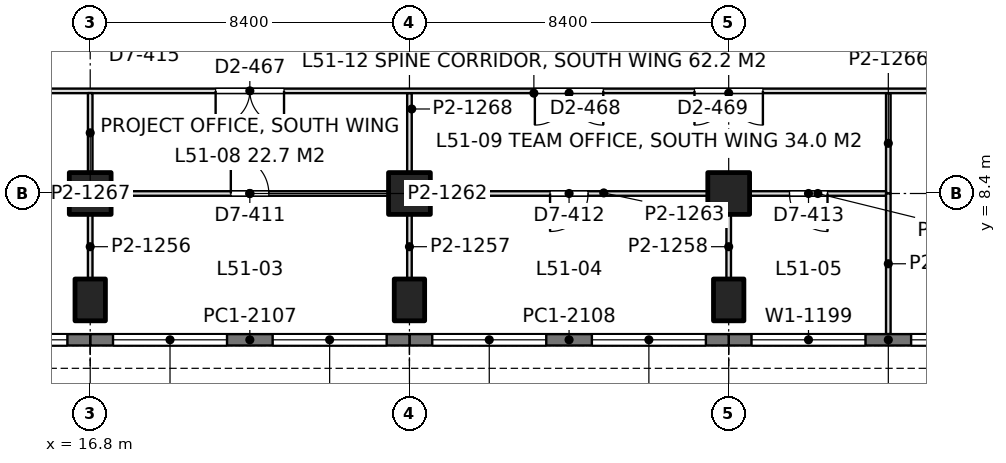
"""IFC4 building model, lengths in metres.
Left out: names, types, materials, properties, quantities, classifications, styles, units other than length and angle.
Written with IfcOpenShell. Run it as: python <this file> out.ifc"""

import sys

from ifc_helpers import new_model, si_unit, direction, frame, frame_2d, origin, origin_2d, place, context, subcontext, project, spatial, rectangle, extrude, element, fill, save


model = new_model("IFC4")
c1 = context("Model", 3, precision=1e-05, world=origin(), true_north=direction((0.0, 1.0)))
c2 = subcontext(c1, "Body", "Model", "MODEL_VIEW")
j1 = project(units=[si_unit("LENGTHUNIT", "METRE"), si_unit("PLANEANGLEUNIT", "RADIAN")], contexts=[c1])
p1 = place(None, origin())
s1 = spatial("IfcSite", under=j1, at=p1, CompositionType="ELEMENT")
p2 = place(p1, origin())
s2 = spatial("IfcBuilding", under=s1, at=p2, CompositionType="ELEMENT")
p3 = place(p2, frame((0.0, 0.0, 223.8)))
s3 = spatial("IfcBuildingStorey", under=s2, at=p3, CompositionType="ELEMENT", Elevation=223.8)
p4 = place(p3, frame((16.8, 5.6, 0.0), z_axis=(0.0, 0.0, 1.0), x_axis=(1.0, 0.0, 0.0)))
e1 = element("IfcColumn", 1, at=p4, inside=s3, PredefinedType="COLUMN", context=c2, shape_type="SweptSolid", body=[
    extrude(rectangle(XDim=0.8, YDim=1.1, at=origin_2d()), origin(), (0.0, 0.0, 1.0), 4.2),
])
p5 = place(p3, frame((16.8, 8.4, 0.0), z_axis=(0.0, 0.0, 1.0), x_axis=(1.0, 0.0, 0.0)))
e2 = element("IfcColumn", 2, at=p5, inside=s3, PredefinedType="COLUMN", context=c2, shape_type="SweptSolid", body=[
    extrude(rectangle(XDim=1.1, YDim=1.1, at=origin_2d()), origin(), (0.0, 0.0, 1.0), 4.2),
])
p6 = place(p3, frame((25.2, 5.6, 0.0), z_axis=(0.0, 0.0, 1.0), x_axis=(1.0, 0.0, 0.0)))
e3 = element("IfcColumn", 3, at=p6, inside=s3, PredefinedType="COLUMN", context=c2, shape_type="SweptSolid", body=[
    extrude(rectangle(XDim=0.8, YDim=1.1, at=origin_2d()), origin(), (0.0, 0.0, 1.0), 4.2),
])
p7 = place(p3, frame((25.2, 8.4, 0.0), z_axis=(0.0, 0.0, 1.0), x_axis=(1.0, 0.0, 0.0)))
e4 = element("IfcColumn", 4, at=p7, inside=s3, PredefinedType="COLUMN", context=c2, shape_type="SweptSolid", body=[
    extrude(rectangle(XDim=1.1, YDim=1.1, at=origin_2d()), origin(), (0.0, 0.0, 1.0), 4.2),
])
p8 = place(p3, frame((33.6, 5.6, 0.0), z_axis=(0.0, 0.0, 1.0), x_axis=(1.0, 0.0, 0.0)))
e5 = element("IfcColumn", 5, at=p8, inside=s3, PredefinedType="COLUMN", context=c2, shape_type="SweptSolid", body=[
    extrude(rectangle(XDim=0.8, YDim=1.1, at=origin_2d()), origin(), (0.0, 0.0, 1.0), 4.2),
])
p9 = place(p3, frame((33.6, 8.4, 0.0), z_axis=(0.0, 0.0, 1.0), x_axis=(1.0, 0.0, 0.0)))
e6 = element("IfcColumn", 6, at=p9, inside=s3, PredefinedType="COLUMN", context=c2, shape_type="SweptSolid", body=[
    extrude(rectangle(XDim=1.1, YDim=1.1, at=origin_2d()), origin(), (0.0, 0.0, 1.0), 4.2),
])
p10 = place(p3, frame((42.0, 4.55, 0.0), z_axis=(0.0, 0.0, 1.0), x_axis=(-1.0, 0.0, 0.0)))
e7 = element("IfcWall", 7, at=p10, inside=s3, PredefinedType="SOLIDWALL", context=c2, shape_type="SweptSolid", body=[
    extrude(rectangle(XDim=8.4, YDim=0.3, at=frame_2d((4.2, 0.0))), origin(), (0.0, 0.0, 1.0), 4.05),
])
p11 = place(p10, frame((0.6, 0.0, 0.9)))
e8 = element("IfcOpeningElement", 8, at=p11, cuts=e7, PredefinedType="OPENING", context=c2, shape_type="SweptSolid", body=[
    extrude(rectangle(XDim=3.0, YDim=1.9, at=frame_2d((1.5, 0.95))), frame((0.0, 0.16, 0.0), z_axis=(0.0, -1.0, 0.0), x_axis=(1.0, 0.0, 0.0)), (0.0, 0.0, 1.0), 0.32),
])
p12 = place(p10, frame((4.8, 0.0, 0.9)))
e9 = element("IfcOpeningElement", 9, at=p12, cuts=e7, PredefinedType="OPENING", context=c2, shape_type="SweptSolid", body=[
    extrude(rectangle(XDim=3.0, YDim=1.9, at=frame_2d((1.5, 0.95))), frame((0.0, 0.16, 0.0), z_axis=(0.0, -1.0, 0.0), x_axis=(1.0, 0.0, 0.0)), (0.0, 0.0, 1.0), 0.32),
])
p13 = place(p3, frame((33.6, 4.55, 0.0), z_axis=(0.0, 0.0, 1.0), x_axis=(-1.0, 0.0, 0.0)))
e10 = element("IfcWall", 10, at=p13, inside=s3, PredefinedType="SOLIDWALL", context=c2, shape_type="SweptSolid", body=[
    extrude(rectangle(XDim=8.4, YDim=0.3, at=frame_2d((4.2, 0.0))), origin(), (0.0, 0.0, 1.0), 4.05),
])
p14 = place(p13, frame((0.6, 0.0, 0.9)))
e11 = element("IfcOpeningElement", 11, at=p14, cuts=e10, PredefinedType="OPENING", context=c2, shape_type="SweptSolid", body=[
    extrude(rectangle(XDim=3.0, YDim=1.9, at=frame_2d((1.5, 0.95))), frame((0.0, 0.16, 0.0), z_axis=(0.0, -1.0, 0.0), x_axis=(1.0, 0.0, 0.0)), (0.0, 0.0, 1.0), 0.32),
])
p15 = place(p13, frame((4.8, 0.0, 0.9)))
e12 = element("IfcOpeningElement", 12, at=p15, cuts=e10, PredefinedType="OPENING", context=c2, shape_type="SweptSolid", body=[
    extrude(rectangle(XDim=3.0, YDim=1.9, at=frame_2d((1.5, 0.95))), frame((0.0, 0.16, 0.0), z_axis=(0.0, -1.0, 0.0), x_axis=(1.0, 0.0, 0.0)), (0.0, 0.0, 1.0), 0.32),
])
p16 = place(p3, frame((25.2, 4.55, 0.0), z_axis=(0.0, 0.0, 1.0), x_axis=(-1.0, 0.0, 0.0)))
e13 = element("IfcWall", 13, at=p16, inside=s3, PredefinedType="SOLIDWALL", context=c2, shape_type="SweptSolid", body=[
    extrude(rectangle(XDim=8.4, YDim=0.3, at=frame_2d((4.2, 0.0))), origin(), (0.0, 0.0, 1.0), 4.05),
])
p17 = place(p16, frame((0.6, 0.0, 0.9)))
e14 = element("IfcOpeningElement", 14, at=p17, cuts=e13, PredefinedType="OPENING", context=c2, shape_type="SweptSolid", body=[
    extrude(rectangle(XDim=3.0, YDim=1.9, at=frame_2d((1.5, 0.95))), frame((0.0, 0.16, 0.0), z_axis=(0.0, -1.0, 0.0), x_axis=(1.0, 0.0, 0.0)), (0.0, 0.0, 1.0), 0.32),
])
p18 = place(p16, frame((4.8, 0.0, 0.9)))
e15 = element("IfcOpeningElement", 15, at=p18, cuts=e13, PredefinedType="OPENING", context=c2, shape_type="SweptSolid", body=[
    extrude(rectangle(XDim=3.0, YDim=1.9, at=frame_2d((1.5, 0.95))), frame((0.0, 0.16, 0.0), z_axis=(0.0, -1.0, 0.0), x_axis=(1.0, 0.0, 0.0)), (0.0, 0.0, 1.0), 0.32),
])
p19 = place(p3, frame((16.8, 4.55, 0.0), z_axis=(0.0, 0.0, 1.0), x_axis=(-1.0, 0.0, 0.0)))
e16 = element("IfcWall", 16, at=p19, inside=s3, PredefinedType="SOLIDWALL", context=c2, shape_type="SweptSolid", body=[
    extrude(rectangle(XDim=8.4, YDim=0.3, at=frame_2d((4.2, 0.0))), origin(), (0.0, 0.0, 1.0), 4.05),
])
p20 = place(p19, frame((0.6, 0.0, 0.9)))
e17 = element("IfcOpeningElement", 17, at=p20, cuts=e16, PredefinedType="OPENING", context=c2, shape_type="SweptSolid", body=[
    extrude(rectangle(XDim=3.0, YDim=1.9, at=frame_2d((1.5, 0.95))), frame((0.0, 0.16, 0.0), z_axis=(0.0, -1.0, 0.0), x_axis=(1.0, 0.0, 0.0)), (0.0, 0.0, 1.0), 0.32),
])
p21 = place(p19, frame((4.8, 0.0, 0.9)))
e18 = element("IfcOpeningElement", 18, at=p21, cuts=e16, PredefinedType="OPENING", context=c2, shape_type="SweptSolid", body=[
    extrude(rectangle(XDim=3.0, YDim=1.9, at=frame_2d((1.5, 0.95))), frame((0.0, 0.16, 0.0), z_axis=(0.0, -1.0, 0.0), x_axis=(1.0, 0.0, 0.0)), (0.0, 0.0, 1.0), 0.32),
])
p22 = place(p3, frame((8.949, 8.4, 0.0), z_axis=(0.0, 0.0, 1.0), x_axis=(1.0, 0.0, 0.0)))
e19 = element("IfcWall", 19, at=p22, inside=s3, PredefinedType="PARTITIONING", context=c2, shape_type="SweptSolid", body=[
    extrude(rectangle(XDim=7.302, YDim=0.12, at=frame_2d((3.651, 0.0))), origin(), (0.0, 0.0, 1.0), 3.55),
])
p23 = place(p22, frame((3.151, 0.0, 0.0)))
e20 = element("IfcOpeningElement", 20, at=p23, cuts=e19, PredefinedType="OPENING", context=c2, shape_type="SweptSolid", body=[
    extrude(rectangle(XDim=1.0, YDim=2.4, at=frame_2d((0.5, 1.2))), frame((0.0, 0.07, 0.0), z_axis=(0.0, -1.0, 0.0), x_axis=(1.0, 0.0, 0.0)), (0.0, 0.0, 1.0), 0.14),
])
p24 = place(p3, frame((17.349, 8.4, 0.0), z_axis=(0.0, 0.0, 1.0), x_axis=(1.0, 0.0, 0.0)))
e21 = element("IfcWall", 21, at=p24, inside=s3, PredefinedType="PARTITIONING", context=c2, shape_type="SweptSolid", body=[
    extrude(rectangle(XDim=7.302, YDim=0.12, at=frame_2d((3.651, 0.0))), origin(), (0.0, 0.0, 1.0), 3.55),
])
p25 = place(p24, frame((3.151, 0.0, 0.0)))
e22 = element("IfcOpeningElement", 22, at=p25, cuts=e21, PredefinedType="OPENING", context=c2, shape_type="SweptSolid", body=[
    extrude(rectangle(XDim=1.0, YDim=2.4, at=frame_2d((0.5, 1.2))), frame((0.0, 0.07, 0.0), z_axis=(0.0, -1.0, 0.0), x_axis=(1.0, 0.0, 0.0)), (0.0, 0.0, 1.0), 0.14),
])
p26 = place(p3, frame((25.749, 8.4, 0.0), z_axis=(0.0, 0.0, 1.0), x_axis=(1.0, 0.0, 0.0)))
e23 = element("IfcWall", 23, at=p26, inside=s3, PredefinedType="PARTITIONING", context=c2, shape_type="SweptSolid", body=[
    extrude(rectangle(XDim=7.302, YDim=0.12, at=frame_2d((3.651, 0.0))), origin(), (0.0, 0.0, 1.0), 3.55),
])
p27 = place(p26, frame((3.151, 0.0, 0.0)))
e24 = element("IfcOpeningElement", 24, at=p27, cuts=e23, PredefinedType="OPENING", context=c2, shape_type="SweptSolid", body=[
    extrude(rectangle(XDim=1.0, YDim=2.4, at=frame_2d((0.5, 1.2))), frame((0.0, 0.07, 0.0), z_axis=(0.0, -1.0, 0.0), x_axis=(1.0, 0.0, 0.0)), (0.0, 0.0, 1.0), 0.14),
])
p28 = place(p3, frame((34.149, 8.4, 0.0), z_axis=(0.0, 0.0, 1.0), x_axis=(1.0, 0.0, 0.0)))
e25 = element("IfcWall", 25, at=p28, inside=s3, PredefinedType="PARTITIONING", context=c2, shape_type="SweptSolid", body=[
    extrude(rectangle(XDim=3.593, YDim=0.12, at=frame_2d((1.796, 0.0))), origin(), (0.0, 0.0, 1.0), 3.55),
])
p29 = place(p28, frame((1.051, 0.0, 0.0)))
e26 = element("IfcOpeningElement", 26, at=p29, cuts=e25, PredefinedType="OPENING", context=c2, shape_type="SweptSolid", body=[
    extrude(rectangle(XDim=1.0, YDim=2.4, at=frame_2d((0.5, 1.2))), frame((0.0, 0.07, 0.0), z_axis=(0.0, -1.0, 0.0), x_axis=(1.0, 0.0, 0.0)), (0.0, 0.0, 1.0), 0.14),
])
for number, where, z_axis, x_axis in (
    (27, (16.8, 6.149, 0.0), (0.0, 0.0, 1.0), (0.0, 1.0, 0.0)),
    (28, (25.2, 6.149, 0.0), (0.0, 0.0, 1.0), (0.0, 1.0, 0.0)),
    (29, (33.6, 6.149, 0.0), (0.0, 0.0, 1.0), (0.0, 1.0, 0.0)),
):
    element("IfcWall", number, at=place(p3, frame(where, z_axis=z_axis, x_axis=x_axis)), inside=s3, PredefinedType="PARTITIONING", context=c2, shape_type="SweptSolid", body=[
        extrude(rectangle(XDim=1.702, YDim=0.12, at=frame_2d((0.851, 0.0))), origin(), (0.0, 0.0, 1.0), 3.69),
    ])
p30 = place(p3, frame((37.8, 4.7, 0.0), z_axis=(0.0, 0.0, 1.0), x_axis=(0.0, 1.0, 0.0)))
e30 = element("IfcWall", 30, at=p30, inside=s3, PredefinedType="PARTITIONING", context=c2, shape_type="SweptSolid", body=[
    extrude(rectangle(XDim=3.702, YDim=0.12, at=frame_2d((1.851, 0.0))), origin(), (0.0, 0.0, 1.0), 3.55),
])
p31 = place(p3, frame((16.8, 8.949, 0.0), z_axis=(0.0, 0.0, 1.0), x_axis=(0.0, 1.0, 0.0)))
e31 = element("IfcWall", 31, at=p31, inside=s3, PredefinedType="PARTITIONING", context=c2, shape_type="SweptSolid", body=[
    extrude(rectangle(XDim=2.093, YDim=0.12, at=frame_2d((1.046, 0.0))), origin(), (0.0, 0.0, 1.0), 3.69),
])
p32 = place(p3, frame((25.2, 8.949, 0.0), z_axis=(0.0, 0.0, 1.0), x_axis=(0.0, 1.0, 0.0)))
e32 = element("IfcWall", 32, at=p32, inside=s3, PredefinedType="PARTITIONING", context=c2, shape_type="SweptSolid", body=[
    extrude(rectangle(XDim=2.093, YDim=0.12, at=frame_2d((1.046, 0.0))), origin(), (0.0, 0.0, 1.0), 3.55),
])
p33 = place(p3, frame((37.8, 8.398, 0.0), z_axis=(0.0, 0.0, 1.0), x_axis=(0.0, 1.0, 0.0)))
e33 = element("IfcWall", 33, at=p33, inside=s3, PredefinedType="PARTITIONING", context=c2, shape_type="SweptSolid", body=[
    extrude(rectangle(XDim=2.644, YDim=0.12, at=frame_2d((1.322, 0.0))), origin(), (0.0, 0.0, 1.0), 3.55),
])
p34 = place(p3, frame((7.748, 11.1, 0.0), z_axis=(0.0, 0.0, 1.0), x_axis=(1.0, 0.0, 0.0)))
e34 = element("IfcWall", 34, at=p34, inside=s3, PredefinedType="PARTITIONING", context=c2, shape_type="SweptSolid", body=[
    extrude(rectangle(XDim=41.452, YDim=0.12, at=frame_2d((20.726, 0.0))), origin(), (0.0, 0.0, 1.0), 3.55),
])
p35 = place(p34, frame((2.119, 0.0, 0.0)))
e35 = element("IfcOpeningElement", 35, at=p35, cuts=e34, PredefinedType="OPENING", context=c2, shape_type="SweptSolid", body=[
    extrude(rectangle(XDim=1.8, YDim=2.2, at=frame_2d((0.9, 1.1))), frame((0.0, 0.07, 0.0), z_axis=(0.0, -1.0, 0.0), x_axis=(1.0, 0.0, 0.0)), (0.0, 0.0, 1.0), 0.14),
])
p36 = place(p34, frame((5.135, 0.0, 0.0)))
e36 = element("IfcOpeningElement", 36, at=p36, cuts=e34, PredefinedType="OPENING", context=c2, shape_type="SweptSolid", body=[
    extrude(rectangle(XDim=1.8, YDim=2.2, at=frame_2d((0.9, 1.1))), frame((0.0, 0.07, 0.0), z_axis=(0.0, -1.0, 0.0), x_axis=(1.0, 0.0, 0.0)), (0.0, 0.0, 1.0), 0.14),
])
p37 = place(p34, frame((12.352, 0.0, 0.0)))
e37 = element("IfcOpeningElement", 37, at=p37, cuts=e34, PredefinedType="OPENING", context=c2, shape_type="SweptSolid", body=[
    extrude(rectangle(XDim=1.8, YDim=2.2, at=frame_2d((0.9, 1.1))), frame((0.0, 0.07, 0.0), z_axis=(0.0, -1.0, 0.0), x_axis=(1.0, 0.0, 0.0)), (0.0, 0.0, 1.0), 0.14),
])
p38 = place(p34, frame((20.752, 0.0, 0.0)))
e38 = element("IfcOpeningElement", 38, at=p38, cuts=e34, PredefinedType="OPENING", context=c2, shape_type="SweptSolid", body=[
    extrude(rectangle(XDim=1.8, YDim=2.2, at=frame_2d((0.9, 1.1))), frame((0.0, 0.07, 0.0), z_axis=(0.0, -1.0, 0.0), x_axis=(1.0, 0.0, 0.0)), (0.0, 0.0, 1.0), 0.14),
])
p39 = place(p34, frame((24.952, 0.0, 0.0)))
e39 = element("IfcOpeningElement", 39, at=p39, cuts=e34, PredefinedType="OPENING", context=c2, shape_type="SweptSolid", body=[
    extrude(rectangle(XDim=1.8, YDim=2.2, at=frame_2d((0.9, 1.1))), frame((0.0, 0.07, 0.0), z_axis=(0.0, -1.0, 0.0), x_axis=(1.0, 0.0, 0.0)), (0.0, 0.0, 1.0), 0.14),
])
p40 = place(p34, frame((32.952, 0.0, 0.0)))
e40 = element("IfcOpeningElement", 40, at=p40, cuts=e34, PredefinedType="OPENING", context=c2, shape_type="SweptSolid", body=[
    extrude(rectangle(XDim=1.8, YDim=2.2, at=frame_2d((0.9, 1.1))), frame((0.0, 0.07, 0.0), z_axis=(0.0, -1.0, 0.0), x_axis=(1.0, 0.0, 0.0)), (0.0, 0.0, 1.0), 0.14),
])
p41 = place(p34, frame((36.752, 0.0, 0.0)))
e41 = element("IfcOpeningElement", 41, at=p41, cuts=e34, PredefinedType="OPENING", context=c2, shape_type="SweptSolid", body=[
    extrude(rectangle(XDim=1.8, YDim=2.2, at=frame_2d((0.9, 1.1))), frame((0.0, 0.07, 0.0), z_axis=(0.0, -1.0, 0.0), x_axis=(1.0, 0.0, 0.0)), (0.0, 0.0, 1.0), 0.14),
])
p42 = place(p11, origin())
e42 = element("IfcWindow", 42, at=p42, inside=s3, PartitioningType="SINGLE_PANEL", PredefinedType="WINDOW", context=c2, shape_type="SweptSolid", body=[
    extrude(rectangle(XDim=3.0, YDim=1.9, at=frame_2d((1.5, 0.95))), frame((0.0, 0.03, 0.0), z_axis=(0.0, -1.0, 0.0), x_axis=(1.0, 0.0, 0.0)), (0.0, 0.0, 1.0), 0.06),
])
fill(e8, e42)
p43 = place(p12, origin())
e43 = element("IfcWindow", 43, at=p43, inside=s3, PartitioningType="SINGLE_PANEL", PredefinedType="WINDOW", context=c2, shape_type="SweptSolid", body=[
    extrude(rectangle(XDim=3.0, YDim=1.9, at=frame_2d((1.5, 0.95))), frame((0.0, 0.03, 0.0), z_axis=(0.0, -1.0, 0.0), x_axis=(1.0, 0.0, 0.0)), (0.0, 0.0, 1.0), 0.06),
])
fill(e9, e43)
p44 = place(p14, origin())
e44 = element("IfcWindow", 44, at=p44, inside=s3, PartitioningType="SINGLE_PANEL", PredefinedType="WINDOW", context=c2, shape_type="SweptSolid", body=[
    extrude(rectangle(XDim=3.0, YDim=1.9, at=frame_2d((1.5, 0.95))), frame((0.0, 0.03, 0.0), z_axis=(0.0, -1.0, 0.0), x_axis=(1.0, 0.0, 0.0)), (0.0, 0.0, 1.0), 0.06),
])
fill(e11, e44)
p45 = place(p15, origin())
e45 = element("IfcWindow", 45, at=p45, inside=s3, PartitioningType="SINGLE_PANEL", PredefinedType="WINDOW", context=c2, shape_type="SweptSolid", body=[
    extrude(rectangle(XDim=3.0, YDim=1.9, at=frame_2d((1.5, 0.95))), frame((0.0, 0.03, 0.0), z_axis=(0.0, -1.0, 0.0), x_axis=(1.0, 0.0, 0.0)), (0.0, 0.0, 1.0), 0.06),
])
fill(e12, e45)
p46 = place(p17, origin())
e46 = element("IfcWindow", 46, at=p46, inside=s3, PartitioningType="SINGLE_PANEL", PredefinedType="WINDOW", context=c2, shape_type="SweptSolid", body=[
    extrude(rectangle(XDim=3.0, YDim=1.9, at=frame_2d((1.5, 0.95))), frame((0.0, 0.03, 0.0), z_axis=(0.0, -1.0, 0.0), x_axis=(1.0, 0.0, 0.0)), (0.0, 0.0, 1.0), 0.06),
])
fill(e14, e46)
p47 = place(p18, origin())
e47 = element("IfcWindow", 47, at=p47, inside=s3, PartitioningType="SINGLE_PANEL", PredefinedType="WINDOW", context=c2, shape_type="SweptSolid", body=[
    extrude(rectangle(XDim=3.0, YDim=1.9, at=frame_2d((1.5, 0.95))), frame((0.0, 0.03, 0.0), z_axis=(0.0, -1.0, 0.0), x_axis=(1.0, 0.0, 0.0)), (0.0, 0.0, 1.0), 0.06),
])
fill(e15, e47)
p48 = place(p20, origin())
e48 = element("IfcWindow", 48, at=p48, inside=s3, PartitioningType="SINGLE_PANEL", PredefinedType="WINDOW", context=c2, shape_type="SweptSolid", body=[
    extrude(rectangle(XDim=3.0, YDim=1.9, at=frame_2d((1.5, 0.95))), frame((0.0, 0.03, 0.0), z_axis=(0.0, -1.0, 0.0), x_axis=(1.0, 0.0, 0.0)), (0.0, 0.0, 1.0), 0.06),
])
fill(e17, e48)
p49 = place(p25, origin())
e49 = element("IfcDoor", 49, at=p49, inside=s3, OperationType="SINGLE_SWING_LEFT", PredefinedType="DOOR", context=c2, shape_type="SweptSolid", body=[
    extrude(rectangle(XDim=1.0, YDim=2.4, at=frame_2d((0.5, 1.2))), frame((0.0, 0.025, 0.0), z_axis=(0.0, -1.0, 0.0), x_axis=(1.0, 0.0, 0.0)), (0.0, 0.0, 1.0), 0.05),
])
fill(e22, e49)
p50 = place(p27, frame((1.0, 0.0, 0.0), z_axis=(0.0, 0.0, 1.0), x_axis=(-1.0, 0.0, 0.0)))
e50 = element("IfcDoor", 50, at=p50, inside=s3, OperationType="SINGLE_SWING_RIGHT", PredefinedType="DOOR", context=c2, shape_type="SweptSolid", body=[
    extrude(rectangle(XDim=1.0, YDim=2.4, at=frame_2d((0.5, 1.2))), frame((0.0, 0.025, 0.0), z_axis=(0.0, -1.0, 0.0), x_axis=(1.0, 0.0, 0.0)), (0.0, 0.0, 1.0), 0.05),
])
fill(e24, e50)
p51 = place(p29, frame((1.0, 0.0, 0.0), z_axis=(0.0, 0.0, 1.0), x_axis=(-1.0, 0.0, 0.0)))
e51 = element("IfcDoor", 51, at=p51, inside=s3, OperationType="SINGLE_SWING_LEFT", PredefinedType="DOOR", context=c2, shape_type="SweptSolid", body=[
    extrude(rectangle(XDim=1.0, YDim=2.4, at=frame_2d((0.5, 1.2))), frame((0.0, 0.025, 0.0), z_axis=(0.0, -1.0, 0.0), x_axis=(1.0, 0.0, 0.0)), (0.0, 0.0, 1.0), 0.05),
])
fill(e26, e51)
p52 = place(p37, frame((1.8, 0.0, 0.0), z_axis=(0.0, 0.0, 1.0), x_axis=(-1.0, 0.0, 0.0)))
e52 = element("IfcDoor", 52, at=p52, inside=s3, OperationType="DOUBLE_DOOR_SINGLE_SWING", PredefinedType="DOOR", context=c2, shape_type="SweptSolid", body=[
    extrude(rectangle(XDim=1.8, YDim=2.2, at=frame_2d((0.9, 1.1))), frame((0.0, 0.025, 0.0), z_axis=(0.0, -1.0, 0.0), x_axis=(1.0, 0.0, 0.0)), (0.0, 0.0, 1.0), 0.05),
])
fill(e37, e52)
p53 = place(p38, frame((1.8, 0.0, 0.0), z_axis=(0.0, 0.0, 1.0), x_axis=(-1.0, 0.0, 0.0)))
e53 = element("IfcDoor", 53, at=p53, inside=s3, OperationType="DOUBLE_DOOR_SINGLE_SWING", PredefinedType="DOOR", context=c2, shape_type="SweptSolid", body=[
    extrude(rectangle(XDim=1.8, YDim=2.2, at=frame_2d((0.9, 1.1))), frame((0.0, 0.025, 0.0), z_axis=(0.0, -1.0, 0.0), x_axis=(1.0, 0.0, 0.0)), (0.0, 0.0, 1.0), 0.05),
])
fill(e38, e53)
p54 = place(p39, frame((1.8, 0.0, 0.0), z_axis=(0.0, 0.0, 1.0), x_axis=(-1.0, 0.0, 0.0)))
e54 = element("IfcDoor", 54, at=p54, inside=s3, OperationType="DOUBLE_DOOR_SINGLE_SWING", PredefinedType="DOOR", context=c2, shape_type="SweptSolid", body=[
    extrude(rectangle(XDim=1.8, YDim=2.2, at=frame_2d((0.9, 1.1))), frame((0.0, 0.025, 0.0), z_axis=(0.0, -1.0, 0.0), x_axis=(1.0, 0.0, 0.0)), (0.0, 0.0, 1.0), 0.05),
])
fill(e39, e54)
save(model, sys.argv[1])
